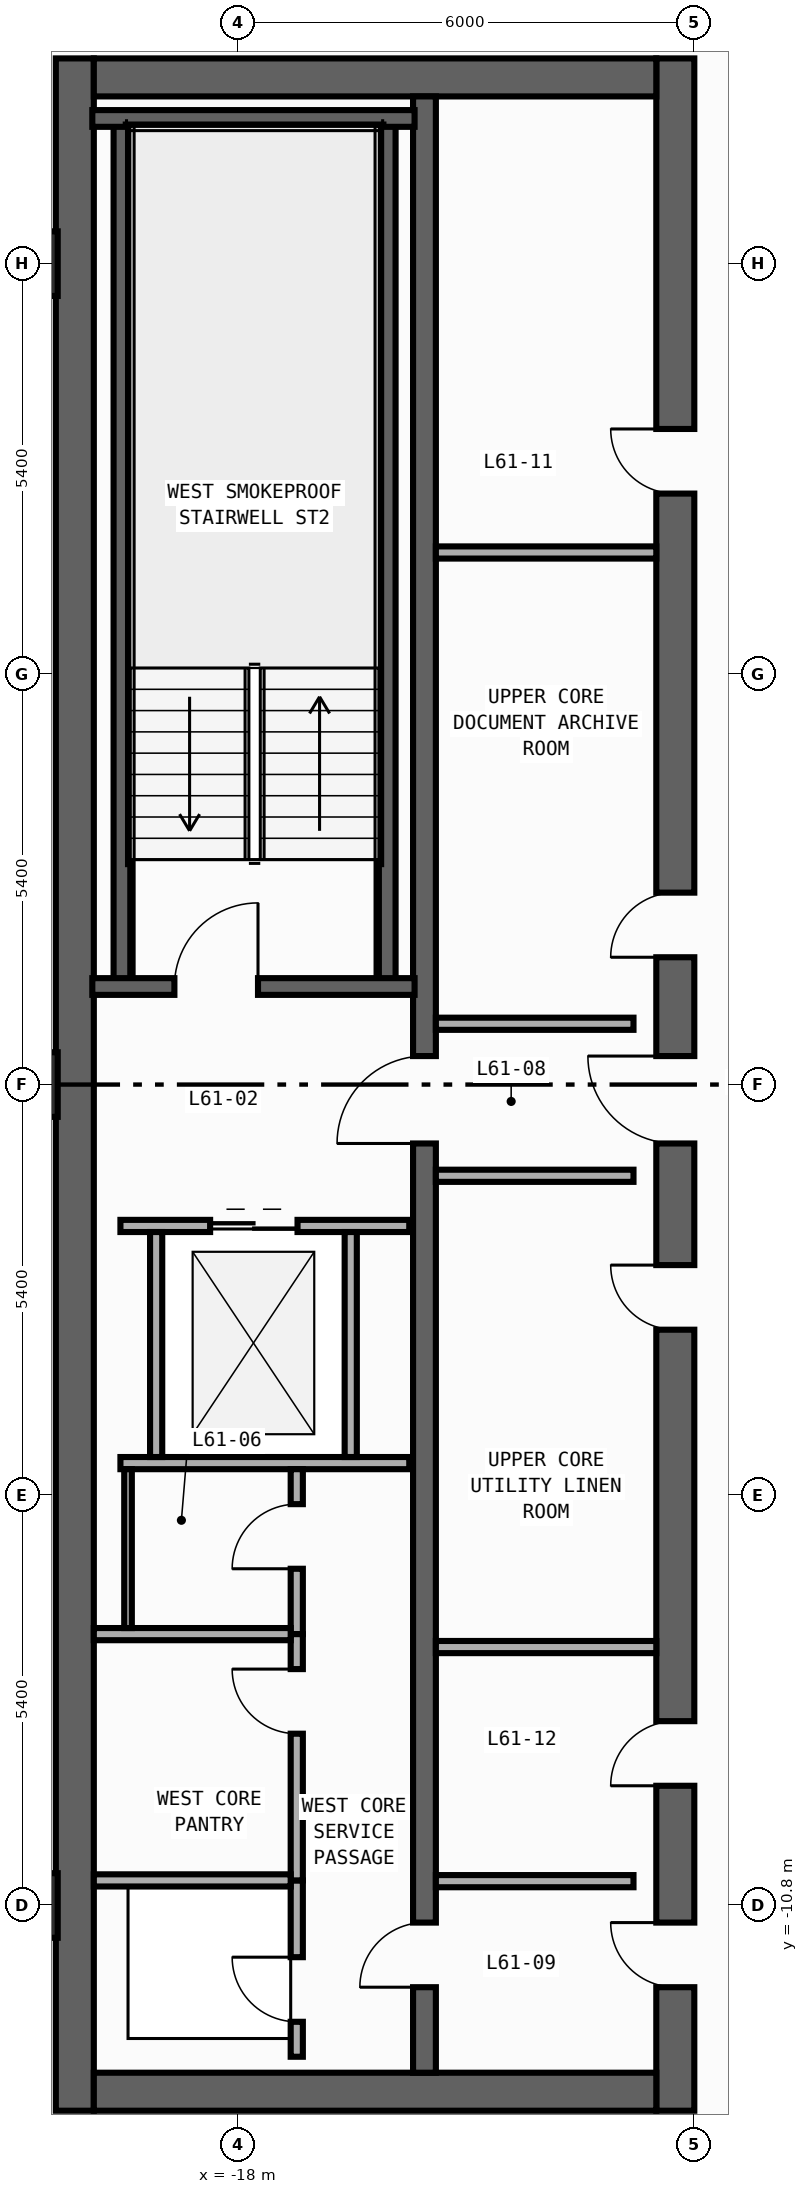
"""IFC4 building model, lengths in metres.
Left out: names, types, materials, properties, quantities, classifications, styles, units other than length and angle.
Written with IfcOpenShell. Run it as: python <this file> out.ifc"""

import sys

from ifc_helpers import new_model, si_unit, direction, frame, frame_2d, origin, origin_2d, place, context, subcontext, project, spatial, rectangle, extrude, element, fill, save


model = new_model("IFC4")
c1 = context("Model", 3, precision=1e-05, world=origin(), true_north=direction((0.0, 1.0)))
c2 = subcontext(c1, "Body", "Model", "MODEL_VIEW")
j1 = project(units=[si_unit("LENGTHUNIT", "METRE"), si_unit("PLANEANGLEUNIT", "RADIAN")], contexts=[c1])
p1 = place(None, origin())
s1 = spatial("IfcSite", under=j1, at=p1, CompositionType="ELEMENT")
p2 = place(p1, origin())
s2 = spatial("IfcBuilding", under=s1, at=p2, CompositionType="ELEMENT")
p3 = place(p2, frame((0.0, 0.0, 258.4)))
s3 = spatial("IfcBuildingStorey", under=s2, at=p3, CompositionType="ELEMENT", Elevation=258.4)
p4 = place(p3, frame((-20.15, -13.5, 0.0), z_axis=(0.0, 0.0, 1.0), x_axis=(0.0, 1.0, 0.0)))
e1 = element("IfcWall", 1, at=p4, inside=s3, PredefinedType="SHEAR", context=c2, shape_type="SweptSolid", body=[
    extrude(rectangle(XDim=27.0, YDim=0.5, at=frame_2d((13.5, 0.0))), origin(), (0.0, 0.0, 1.0), 3.34),
])
p5 = place(p3, frame((-12.25, -13.5, 0.0), z_axis=(0.0, 0.0, 1.0), x_axis=(0.0, 1.0, 0.0)))
e2 = element("IfcWall", 2, at=p5, inside=s3, PredefinedType="SHEAR", context=c2, shape_type="SweptSolid", body=[
    extrude(rectangle(XDim=27.0, YDim=0.5, at=frame_2d((13.5, 0.0))), origin(), (0.0, 0.0, 1.0), 3.34),
])
p6 = place(p5, frame((15.175, 0.0, 0.0)))
e3 = element("IfcOpeningElement", 3, at=p6, cuts=e2, PredefinedType="OPENING", context=c2, shape_type="SweptSolid", body=[
    extrude(rectangle(XDim=0.85, YDim=2.1, at=frame_2d((0.425, 1.05))), frame((0.0, 0.26, 0.0), z_axis=(0.0, -1.0, 0.0), x_axis=(1.0, 0.0, 0.0)), (0.0, 0.0, 1.0), 0.52),
])
p7 = place(p5, frame((21.275, 0.0, 0.0)))
e4 = element("IfcOpeningElement", 4, at=p7, cuts=e2, PredefinedType="OPENING", context=c2, shape_type="SweptSolid", body=[
    extrude(rectangle(XDim=0.85, YDim=2.1, at=frame_2d((0.425, 1.05))), frame((0.0, 0.26, 0.0), z_axis=(0.0, -1.0, 0.0), x_axis=(1.0, 0.0, 0.0)), (0.0, 0.0, 1.0), 0.52),
])
p8 = place(p5, frame((4.275, 0.0, 0.0)))
e5 = element("IfcOpeningElement", 5, at=p8, cuts=e2, PredefinedType="OPENING", context=c2, shape_type="SweptSolid", body=[
    extrude(rectangle(XDim=0.85, YDim=2.1, at=frame_2d((0.425, 1.05))), frame((0.0, 0.26, 0.0), z_axis=(0.0, -1.0, 0.0), x_axis=(1.0, 0.0, 0.0)), (0.0, 0.0, 1.0), 0.52),
])
p9 = place(p5, frame((10.275, 0.0, 0.0)))
e6 = element("IfcOpeningElement", 6, at=p9, cuts=e2, PredefinedType="OPENING", context=c2, shape_type="SweptSolid", body=[
    extrude(rectangle(XDim=0.85, YDim=2.1, at=frame_2d((0.425, 1.05))), frame((0.0, 0.26, 0.0), z_axis=(0.0, -1.0, 0.0), x_axis=(1.0, 0.0, 0.0)), (0.0, 0.0, 1.0), 0.52),
])
p10 = place(p5, frame((12.725, 0.0, 0.0)))
e7 = element("IfcOpeningElement", 7, at=p10, cuts=e2, PredefinedType="OPENING", context=c2, shape_type="SweptSolid", body=[
    extrude(rectangle(XDim=1.15, YDim=2.2, at=frame_2d((0.575, 1.1))), frame((0.0, 0.26, 0.0), z_axis=(0.0, -1.0, 0.0), x_axis=(1.0, 0.0, 0.0)), (0.0, 0.0, 1.0), 0.52),
])
p11 = place(p5, frame((1.625, 0.0, 0.0)))
e8 = element("IfcOpeningElement", 8, at=p11, cuts=e2, PredefinedType="OPENING", context=c2, shape_type="SweptSolid", body=[
    extrude(rectangle(XDim=0.85, YDim=2.1, at=frame_2d((0.425, 1.05))), frame((0.0, 0.26, 0.0), z_axis=(0.0, -1.0, 0.0), x_axis=(1.0, 0.0, 0.0)), (0.0, 0.0, 1.0), 0.52),
])
for number, where, z_axis, x_axis in (
    (9, (-19.9, -13.25, 0.0), (0.0, 0.0, 1.0), (1.0, 0.0, 0.0)),
    (10, (-19.9, 13.25, 0.0), (0.0, 0.0, 1.0), (1.0, 0.0, 0.0)),
):
    element("IfcWall", number, at=place(p3, frame(where, z_axis=z_axis, x_axis=x_axis)), inside=s3, PredefinedType="SHEAR", context=c2, shape_type="SweptSolid", body=[
        extrude(rectangle(XDim=7.4, YDim=0.5, at=frame_2d((3.7, 0.0))), origin(), (0.0, 0.0, 1.0), 3.34),
    ])
p12 = place(p3, frame((-15.55, -13.0, 0.0), z_axis=(0.0, 0.0, 1.0), x_axis=(0.0, 1.0, 0.0)))
e11 = element("IfcWall", 11, at=p12, inside=s3, PredefinedType="SHEAR", context=c2, shape_type="SweptSolid", body=[
    extrude(rectangle(XDim=26.0, YDim=0.3, at=frame_2d((13.0, 0.0))), origin(), (0.0, 0.0, 1.0), 3.34),
])
p13 = place(p12, frame((12.225, 0.0, 0.0)))
e12 = element("IfcOpeningElement", 12, at=p13, cuts=e11, PredefinedType="OPENING", context=c2, shape_type="SweptSolid", body=[
    extrude(rectangle(XDim=1.15, YDim=2.2, at=frame_2d((0.575, 1.1))), frame((0.0, 0.16, 0.0), z_axis=(0.0, -1.0, 0.0), x_axis=(1.0, 0.0, 0.0)), (0.0, 0.0, 1.0), 0.32),
])
p14 = place(p12, frame((1.125, 0.0, 0.0)))
e13 = element("IfcOpeningElement", 13, at=p14, cuts=e11, PredefinedType="OPENING", context=c2, shape_type="SweptSolid", body=[
    extrude(rectangle(XDim=0.85, YDim=2.1, at=frame_2d((0.425, 1.05))), frame((0.0, 0.16, 0.0), z_axis=(0.0, -1.0, 0.0), x_axis=(1.0, 0.0, 0.0)), (0.0, 0.0, 1.0), 0.32),
])
for number, where, z_axis, x_axis in (
    (14, (-16.04, 1.29, 0.0), (0.0, 0.0, 1.0), (0.0, 1.0, 0.0)),
    (15, (-19.53, 1.29, 0.0), (0.0, 0.0, 1.0), (0.0, 1.0, 0.0)),
):
    element("IfcWall", number, at=place(p3, frame(where, z_axis=z_axis, x_axis=x_axis)), inside=s3, PredefinedType="SHEAR", context=c2, shape_type="SweptSolid", body=[
        extrude(rectangle(XDim=11.42, YDim=0.22, at=frame_2d((5.71, 0.0))), origin(), (0.0, 0.0, 1.0), 3.34),
    ])
p15 = place(p3, frame((-19.92, 12.71, 0.0), z_axis=(0.0, 0.0, 1.0), x_axis=(1.0, 0.0, 0.0)))
e16 = element("IfcWall", 16, at=p15, inside=s3, PredefinedType="SHEAR", context=c2, shape_type="SweptSolid", body=[
    extrude(rectangle(XDim=4.24, YDim=0.22, at=frame_2d((2.12, 0.0))), origin(), (0.0, 0.0, 1.0), 3.34),
])
p16 = place(p3, frame((-19.92, 1.29, 0.0), z_axis=(0.0, 0.0, 1.0), x_axis=(1.0, 0.0, 0.0)))
e17 = element("IfcWall", 17, at=p16, inside=s3, PredefinedType="SHEAR", context=c2, shape_type="SweptSolid", body=[
    extrude(rectangle(XDim=4.24, YDim=0.22, at=frame_2d((2.12, 0.0))), origin(), (0.0, 0.0, 1.0), 3.34),
])
p17 = place(p16, frame((1.08, 0.0, 0.0)))
e18 = element("IfcOpeningElement", 18, at=p17, cuts=e17, PredefinedType="OPENING", context=c2, shape_type="SweptSolid", body=[
    extrude(rectangle(XDim=1.1, YDim=2.2, at=frame_2d((0.55, 1.1))), frame((0.0, 0.12, 0.0), z_axis=(0.0, -1.0, 0.0), x_axis=(1.0, 0.0, 0.0)), (0.0, 0.0, 1.0), 0.24),
])
for number, where, z_axis, x_axis in (
    (19, (-20.8, -10.8, 0.0), (0.0, 0.0, 1.0), (1.0, 0.0, 0.0)),
    (20, (-20.8, 0.0, 0.0), (0.0, 0.0, 1.0), (1.0, 0.0, 0.0)),
    (21, (-20.8, 10.8, 0.0), (0.0, 0.0, 1.0), (1.0, 0.0, 0.0)),
):
    element("IfcColumn", number, at=place(p3, frame(where, z_axis=z_axis, x_axis=x_axis)), inside=s3, PredefinedType="COLUMN", context=c2, shape_type="SweptSolid", body=[
        extrude(rectangle(XDim=0.85, YDim=0.85, at=origin_2d()), origin(), (0.0, 0.0, 1.0), 3.6),
    ])
p18 = place(p3, frame((-19.55, -1.86, 0.0), z_axis=(0.0, 0.0, 1.0), x_axis=(1.0, 0.0, 0.0)))
e22 = element("IfcWall", 22, at=p18, inside=s3, PredefinedType="STANDARD", context=c2, shape_type="SweptSolid", body=[
    extrude(rectangle(XDim=3.8, YDim=0.16, at=frame_2d((1.9, 0.0))), origin(), (0.0, 0.0, 1.0), 3.34),
])
p19 = place(p18, frame((1.18, 0.0, 0.0)))
e23 = element("IfcOpeningElement", 23, at=p19, cuts=e22, PredefinedType="OPENING", context=c2, shape_type="SweptSolid", body=[
    extrude(rectangle(XDim=1.15, YDim=2.2, at=frame_2d((0.575, 1.1))), frame((0.0, 0.09, 0.0), z_axis=(0.0, -1.0, 0.0), x_axis=(1.0, 0.0, 0.0)), (0.0, 0.0, 1.0), 0.18),
])
p20 = place(p3, frame((-19.55, -4.98, 0.0), z_axis=(0.0, 0.0, 1.0), x_axis=(1.0, 0.0, 0.0)))
e24 = element("IfcWall", 24, at=p20, inside=s3, PredefinedType="STANDARD", context=c2, shape_type="SweptSolid", body=[
    extrude(rectangle(XDim=3.8, YDim=0.16, at=frame_2d((1.9, 0.0))), origin(), (0.0, 0.0, 1.0), 3.34),
])
for number, where, z_axis, x_axis in (
    (25, (-19.08, -4.9, 0.0), (0.0, 0.0, 1.0), (0.0, 1.0, 0.0)),
    (26, (-16.52, -4.9, 0.0), (0.0, 0.0, 1.0), (0.0, 1.0, 0.0)),
):
    element("IfcWall", number, at=place(p3, frame(where, z_axis=z_axis, x_axis=x_axis)), inside=s3, PredefinedType="STANDARD", context=c2, shape_type="SweptSolid", body=[
        extrude(rectangle(XDim=2.96, YDim=0.16, at=frame_2d((1.48, 0.0))), origin(), (0.0, 0.0, 1.0), 3.34),
    ])
for number, where, z_axis, x_axis in (
    (27, (-15.4, 0.8, 0.0), (0.0, 0.0, 1.0), (1.0, 0.0, 0.0)),
    (28, (-15.4, -1.2, 0.0), (0.0, 0.0, 1.0), (1.0, 0.0, 0.0)),
    (29, (-15.4, -10.48, 0.0), (0.0, 0.0, 1.0), (1.0, 0.0, 0.0)),
):
    element("IfcWall", number, at=place(p3, frame(where, z_axis=z_axis, x_axis=x_axis)), inside=s3, PredefinedType="STANDARD", context=c2, shape_type="SweptSolid", body=[
        extrude(rectangle(XDim=2.6, YDim=0.16, at=frame_2d((1.3, 0.0))), origin(), (0.0, 0.0, 1.0), 3.34),
    ])
p21 = place(p3, frame((-17.23, -12.79, 0.0), z_axis=(0.0, 0.0, 1.0), x_axis=(0.0, 1.0, 0.0)))
e30 = element("IfcWall", 30, at=p21, inside=s3, PredefinedType="PARTITIONING", context=c2, shape_type="SweptSolid", body=[
    extrude(rectangle(XDim=2.32, YDim=0.16, at=frame_2d((1.16, 0.0))), origin(), (0.0, 0.0, 1.0), 3.34),
])
p22 = place(p21, frame((0.46, 0.0, 0.0)))
e31 = element("IfcOpeningElement", 31, at=p22, cuts=e30, PredefinedType="OPENING", context=c2, shape_type="SweptSolid", body=[
    extrude(rectangle(XDim=0.85, YDim=2.1, at=frame_2d((0.425, 1.05))), frame((0.0, 0.09, 0.0), z_axis=(0.0, -1.0, 0.0), x_axis=(1.0, 0.0, 0.0)), (0.0, 0.0, 1.0), 0.18),
])
p23 = place(p3, frame((-17.23, -7.23, 0.0), z_axis=(0.0, 0.0, 1.0), x_axis=(0.0, 1.0, 0.0)))
e32 = element("IfcWall", 32, at=p23, inside=s3, PredefinedType="PARTITIONING", context=c2, shape_type="SweptSolid", body=[
    extrude(rectangle(XDim=2.17, YDim=0.16, at=frame_2d((1.085, 0.0))), origin(), (0.0, 0.0, 1.0), 3.34),
])
p24 = place(p23, frame((0.86, 0.0, 0.0)))
e33 = element("IfcOpeningElement", 33, at=p24, cuts=e32, PredefinedType="OPENING", context=c2, shape_type="SweptSolid", body=[
    extrude(rectangle(XDim=0.85, YDim=2.1, at=frame_2d((0.425, 1.05))), frame((0.0, 0.09, 0.0), z_axis=(0.0, -1.0, 0.0), x_axis=(1.0, 0.0, 0.0)), (0.0, 0.0, 1.0), 0.18),
])
p25 = place(p3, frame((-17.23, -10.47, 0.0), z_axis=(0.0, 0.0, 1.0), x_axis=(0.0, 1.0, 0.0)))
e34 = element("IfcWall", 34, at=p25, inside=s3, PredefinedType="PARTITIONING", context=c2, shape_type="SweptSolid", body=[
    extrude(rectangle(XDim=3.24, YDim=0.16, at=frame_2d((1.62, 0.0))), origin(), (0.0, 0.0, 1.0), 3.34),
])
p26 = place(p25, frame((1.93, 0.0, 0.0)))
e35 = element("IfcOpeningElement", 35, at=p26, cuts=e34, PredefinedType="OPENING", context=c2, shape_type="SweptSolid", body=[
    extrude(rectangle(XDim=0.85, YDim=2.1, at=frame_2d((0.425, 1.05))), frame((0.0, 0.09, 0.0), z_axis=(0.0, -1.0, 0.0), x_axis=(1.0, 0.0, 0.0)), (0.0, 0.0, 1.0), 0.18),
])
p27 = place(p3, frame((-19.9, -10.47, 0.0), z_axis=(0.0, 0.0, 1.0), x_axis=(1.0, 0.0, 0.0)))
e36 = element("IfcWall", 36, at=p27, inside=s3, PredefinedType="PARTITIONING", context=c2, shape_type="SweptSolid", body=[
    extrude(rectangle(XDim=2.59, YDim=0.16, at=frame_2d((1.295, 0.0))), origin(), (0.0, 0.0, 1.0), 1.94),
])
p28 = place(p3, frame((-19.9, -7.23, 0.0), z_axis=(0.0, 0.0, 1.0), x_axis=(1.0, 0.0, 0.0)))
e37 = element("IfcWall", 37, at=p28, inside=s3, PredefinedType="PARTITIONING", context=c2, shape_type="SweptSolid", body=[
    extrude(rectangle(XDim=2.59, YDim=0.16, at=frame_2d((1.295, 0.0))), origin(), (0.0, 0.0, 1.0), 3.34),
])
for number, where, z_axis, x_axis in (
    (38, (-15.4, 7.0, 0.0), (0.0, 0.0, 1.0), (1.0, 0.0, 0.0)),
    (39, (-15.4, -7.4, 0.0), (0.0, 0.0, 1.0), (1.0, 0.0, 0.0)),
):
    element("IfcWall", number, at=place(p3, frame(where, z_axis=z_axis, x_axis=x_axis)), inside=s3, PredefinedType="PARTITIONING", context=c2, shape_type="SweptSolid", body=[
        extrude(rectangle(XDim=2.9, YDim=0.16, at=frame_2d((1.45, 0.0))), origin(), (0.0, 0.0, 1.0), 3.34),
    ])
p29 = place(p3, frame((-19.45, -7.15, 0.0), z_axis=(0.0, 0.0, 1.0), x_axis=(0.0, 1.0, 0.0)))
e40 = element("IfcWall", 40, at=p29, inside=s3, PredefinedType="PARTITIONING", context=c2, shape_type="SweptSolid", body=[
    extrude(rectangle(XDim=2.09, YDim=0.1, at=frame_2d((1.045, 0.0))), origin(), (0.0, 0.0, 1.0), 3.34),
])
p30 = place(p17, origin())
e41 = element("IfcDoor", 41, at=p30, inside=s3, OperationType="SINGLE_SWING_RIGHT", PredefinedType="DOOR", context=c2, shape_type="SweptSolid", body=[
    extrude(rectangle(XDim=1.1, YDim=2.2, at=frame_2d((0.55, 1.1))), frame((0.0, 0.025, 0.0), z_axis=(0.0, -1.0, 0.0), x_axis=(1.0, 0.0, 0.0)), (0.0, 0.0, 1.0), 0.05),
])
fill(e18, e41)
p31 = place(p6, origin())
e42 = element("IfcDoor", 42, at=p31, inside=s3, OperationType="SINGLE_SWING_LEFT", PredefinedType="DOOR", context=c2, shape_type="SweptSolid", body=[
    extrude(rectangle(XDim=0.85, YDim=2.1, at=frame_2d((0.425, 1.05))), frame((0.0, 0.025, 0.0), z_axis=(0.0, -1.0, 0.0), x_axis=(1.0, 0.0, 0.0)), (0.0, 0.0, 1.0), 0.05),
])
fill(e3, e42)
p32 = place(p7, origin())
e43 = element("IfcDoor", 43, at=p32, inside=s3, OperationType="SINGLE_SWING_RIGHT", PredefinedType="DOOR", context=c2, shape_type="SweptSolid", body=[
    extrude(rectangle(XDim=0.85, YDim=2.1, at=frame_2d((0.425, 1.05))), frame((0.0, 0.025, 0.0), z_axis=(0.0, -1.0, 0.0), x_axis=(1.0, 0.0, 0.0)), (0.0, 0.0, 1.0), 0.05),
])
fill(e4, e43)
p33 = place(p8, origin())
e44 = element("IfcDoor", 44, at=p33, inside=s3, OperationType="SINGLE_SWING_LEFT", PredefinedType="DOOR", context=c2, shape_type="SweptSolid", body=[
    extrude(rectangle(XDim=0.85, YDim=2.1, at=frame_2d((0.425, 1.05))), frame((0.0, 0.025, 0.0), z_axis=(0.0, -1.0, 0.0), x_axis=(1.0, 0.0, 0.0)), (0.0, 0.0, 1.0), 0.05),
])
fill(e5, e44)
p34 = place(p9, origin())
e45 = element("IfcDoor", 45, at=p34, inside=s3, OperationType="SINGLE_SWING_RIGHT", PredefinedType="DOOR", context=c2, shape_type="SweptSolid", body=[
    extrude(rectangle(XDim=0.85, YDim=2.1, at=frame_2d((0.425, 1.05))), frame((0.0, 0.025, 0.0), z_axis=(0.0, -1.0, 0.0), x_axis=(1.0, 0.0, 0.0)), (0.0, 0.0, 1.0), 0.05),
])
fill(e6, e45)
p35 = place(p10, origin())
e46 = element("IfcDoor", 46, at=p35, inside=s3, OperationType="SINGLE_SWING_RIGHT", PredefinedType="DOOR", context=c2, shape_type="SweptSolid", body=[
    extrude(rectangle(XDim=1.15, YDim=2.2, at=frame_2d((0.575, 1.1))), frame((0.0, 0.025, 0.0), z_axis=(0.0, -1.0, 0.0), x_axis=(1.0, 0.0, 0.0)), (0.0, 0.0, 1.0), 0.05),
])
fill(e7, e46)
p36 = place(p13, origin())
e47 = element("IfcDoor", 47, at=p36, inside=s3, OperationType="SINGLE_SWING_LEFT", PredefinedType="DOOR", context=c2, shape_type="SweptSolid", body=[
    extrude(rectangle(XDim=1.15, YDim=2.2, at=frame_2d((0.575, 1.1))), frame((0.0, 0.025, 0.0), z_axis=(0.0, -1.0, 0.0), x_axis=(1.0, 0.0, 0.0)), (0.0, 0.0, 1.0), 0.05),
])
fill(e12, e47)
p37 = place(p11, origin())
e48 = element("IfcDoor", 48, at=p37, inside=s3, OperationType="SINGLE_SWING_RIGHT", PredefinedType="DOOR", context=c2, shape_type="SweptSolid", body=[
    extrude(rectangle(XDim=0.85, YDim=2.1, at=frame_2d((0.425, 1.05))), frame((0.0, 0.025, 0.0), z_axis=(0.0, -1.0, 0.0), x_axis=(1.0, 0.0, 0.0)), (0.0, 0.0, 1.0), 0.05),
])
fill(e8, e48)
p38 = place(p14, origin())
e49 = element("IfcDoor", 49, at=p38, inside=s3, OperationType="SINGLE_SWING_LEFT", PredefinedType="DOOR", context=c2, shape_type="SweptSolid", body=[
    extrude(rectangle(XDim=0.85, YDim=2.1, at=frame_2d((0.425, 1.05))), frame((0.0, 0.025, 0.0), z_axis=(0.0, -1.0, 0.0), x_axis=(1.0, 0.0, 0.0)), (0.0, 0.0, 1.0), 0.05),
])
fill(e13, e49)
p39 = place(p19, origin())
e50 = element("IfcDoor", 50, at=p39, inside=s3, OperationType="DOUBLE_DOOR_SLIDING", PredefinedType="DOOR", context=c2, shape_type="SweptSolid", body=[
    extrude(rectangle(XDim=1.15, YDim=2.2, at=frame_2d((0.575, 1.1))), frame((0.0, 0.025, 0.0), z_axis=(0.0, -1.0, 0.0), x_axis=(1.0, 0.0, 0.0)), (0.0, 0.0, 1.0), 0.05),
])
fill(e23, e50)
p40 = place(p22, origin())
e51 = element("IfcDoor", 51, at=p40, inside=s3, OperationType="SINGLE_SWING_RIGHT", PredefinedType="DOOR", context=c2, shape_type="SweptSolid", body=[
    extrude(rectangle(XDim=0.85, YDim=2.1, at=frame_2d((0.425, 1.05))), frame((0.0, 0.025, 0.0), z_axis=(0.0, -1.0, 0.0), x_axis=(1.0, 0.0, 0.0)), (0.0, 0.0, 1.0), 0.05),
])
fill(e31, e51)
p41 = place(p24, origin())
e52 = element("IfcDoor", 52, at=p41, inside=s3, OperationType="SINGLE_SWING_LEFT", PredefinedType="DOOR", context=c2, shape_type="SweptSolid", body=[
    extrude(rectangle(XDim=0.85, YDim=2.1, at=frame_2d((0.425, 1.05))), frame((0.0, 0.025, 0.0), z_axis=(0.0, -1.0, 0.0), x_axis=(1.0, 0.0, 0.0)), (0.0, 0.0, 1.0), 0.05),
])
fill(e33, e52)
p42 = place(p26, origin())
e53 = element("IfcDoor", 53, at=p42, inside=s3, OperationType="SINGLE_SWING_RIGHT", PredefinedType="DOOR", context=c2, shape_type="SweptSolid", body=[
    extrude(rectangle(XDim=0.85, YDim=2.1, at=frame_2d((0.425, 1.05))), frame((0.0, 0.025, 0.0), z_axis=(0.0, -1.0, 0.0), x_axis=(1.0, 0.0, 0.0)), (0.0, 0.0, 1.0), 0.05),
])
fill(e35, e53)
save(model, sys.argv[1])
